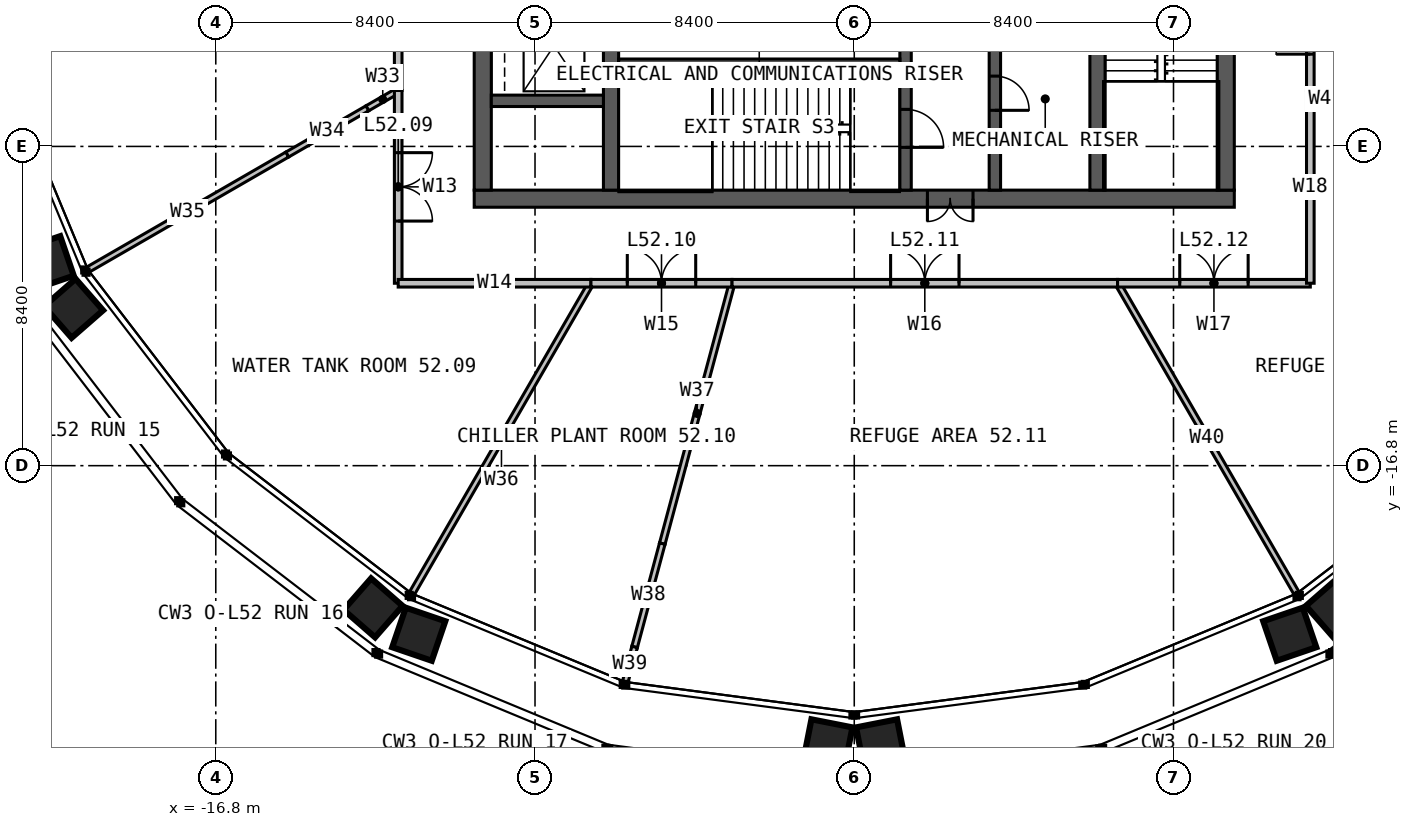
"""IFC4 building model, lengths in metres.
Left out: names, types, materials, properties, quantities, classifications, styles, units other than length and angle.
Written with IfcOpenShell. Run it as: python <this file> out.ifc"""

import sys

from ifc_helpers import new_model, si_unit, direction, frame, frame_2d, origin, place, context, subcontext, project, spatial, rectangle, extrude, element, fill, save


model = new_model("IFC4")
c1 = context("Model", 3, precision=1e-05, world=origin(), true_north=direction((0.0, 1.0)))
c2 = subcontext(c1, "Body", "Model", "MODEL_VIEW")
j1 = project(units=[si_unit("LENGTHUNIT", "METRE"), si_unit("PLANEANGLEUNIT", "RADIAN")], contexts=[c1])
p1 = place(None, origin())
s1 = spatial("IfcSite", under=j1, at=p1, CompositionType="ELEMENT")
p2 = place(p1, origin())
s2 = spatial("IfcBuilding", under=s1, at=p2, CompositionType="ELEMENT")
p3 = place(p2, frame((0.0, 0.0, 215.0)))
s3 = spatial("IfcBuildingStorey", under=s2, at=p3, CompositionType="ELEMENT", Elevation=215.0)
p4 = place(p3, frame((10.0, -9.775, 0.0), z_axis=(0.0, 0.0, 1.0), x_axis=(-1.0, 0.0, 0.0)))
e1 = element("IfcWall", 1, at=p4, inside=s3, PredefinedType="SOLIDWALL", context=c2, shape_type="SweptSolid", body=[
    extrude(rectangle(XDim=20.0, YDim=0.45, at=frame_2d((10.0, 0.0))), origin(), (0.0, 0.0, 1.0), 5.0),
])
p5 = place(p4, frame((6.875, 0.0, 0.0)))
e2 = element("IfcOpeningElement", 2, at=p5, cuts=e1, PredefinedType="OPENING", context=c2, shape_type="SweptSolid", body=[
    extrude(rectangle(XDim=1.2, YDim=2.2, at=frame_2d((0.6, 1.1))), frame((0.0, 0.235, 0.0), z_axis=(0.0, -1.0, 0.0), x_axis=(1.0, 0.0, 0.0)), (0.0, 0.0, 1.0), 0.47),
])
for number, where, z_axis, x_axis in (
    (3, (9.775, -9.55, 0.0), (0.0, 0.0, 1.0), (0.0, 1.0, 0.0)),
    (4, (-9.775, 9.55, 0.0), (0.0, 0.0, 1.0), (0.0, -1.0, 0.0)),
):
    element("IfcWall", number, at=place(p3, frame(where, z_axis=z_axis, x_axis=x_axis)), inside=s3, PredefinedType="SOLIDWALL", context=c2, shape_type="SweptSolid", body=[
        extrude(rectangle(XDim=19.1, YDim=0.45, at=frame_2d((9.55, 0.0))), origin(), (0.0, 0.0, 1.0), 5.0),
    ])
p6 = place(p3, frame((-6.4, -9.55, 0.0), z_axis=(0.0, 0.0, 1.0), x_axis=(0.0, 1.0, 0.0)))
e5 = element("IfcWall", 5, at=p6, inside=s3, PredefinedType="SOLIDWALL", context=c2, shape_type="SweptSolid", body=[
    extrude(rectangle(XDim=19.1, YDim=0.4, at=frame_2d((9.55, 0.0))), origin(), (0.0, 0.0, 1.0), 5.0),
])
p7 = place(p6, frame((9.05, 0.0, 0.0)))
e6 = element("IfcOpeningElement", 6, at=p7, cuts=e5, PredefinedType="OPENING", context=c2, shape_type="SweptSolid", body=[
    extrude(rectangle(XDim=1.0, YDim=2.2, at=frame_2d((0.5, 1.1))), frame((0.0, 0.21, 0.0), z_axis=(0.0, -1.0, 0.0), x_axis=(1.0, 0.0, 0.0)), (0.0, 0.0, 1.0), 0.42),
])
p8 = place(p3, frame((6.4, 9.55, 0.0), z_axis=(0.0, 0.0, 1.0), x_axis=(0.0, -1.0, 0.0)))
e7 = element("IfcWall", 7, at=p8, inside=s3, PredefinedType="SOLIDWALL", context=c2, shape_type="SweptSolid", body=[
    extrude(rectangle(XDim=19.1, YDim=0.4, at=frame_2d((9.55, 0.0))), origin(), (0.0, 0.0, 1.0), 5.0),
])
p9 = place(p8, frame((9.05, 0.0, 0.0)))
e8 = element("IfcOpeningElement", 8, at=p9, cuts=e7, PredefinedType="OPENING", context=c2, shape_type="SweptSolid", body=[
    extrude(rectangle(XDim=1.0, YDim=2.2, at=frame_2d((0.5, 1.1))), frame((0.0, 0.21, 0.0), z_axis=(0.0, -1.0, 0.0), x_axis=(1.0, 0.0, 0.0)), (0.0, 0.0, 1.0), 0.42),
])
p10 = place(p3, frame((1.35, -1.45, 0.0), z_axis=(0.0, 0.0, 1.0), x_axis=(0.0, -1.0, 0.0)))
e9 = element("IfcWall", 9, at=p10, inside=s3, PredefinedType="SOLIDWALL", context=c2, shape_type="SweptSolid", body=[
    extrude(rectangle(XDim=8.1, YDim=0.3, at=frame_2d((4.05, 0.0))), origin(), (0.0, 0.0, 1.0), 5.0),
])
p11 = place(p10, frame((5.975, 0.0, 0.0)))
e10 = element("IfcOpeningElement", 10, at=p11, cuts=e9, PredefinedType="OPENING", context=c2, shape_type="SweptSolid", body=[
    extrude(rectangle(XDim=1.0, YDim=2.2, at=frame_2d((0.5, 1.1))), frame((0.0, 0.16, 0.0), z_axis=(0.0, -1.0, 0.0), x_axis=(1.0, 0.0, 0.0)), (0.0, 0.0, 1.0), 0.32),
])
p12 = place(p10, frame((3.525, 0.0, 0.0)))
e11 = element("IfcOpeningElement", 11, at=p12, cuts=e9, PredefinedType="OPENING", context=c2, shape_type="SweptSolid", body=[
    extrude(rectangle(XDim=0.9, YDim=2.2, at=frame_2d((0.45, 1.1))), frame((0.0, 0.16, 0.0), z_axis=(0.0, -1.0, 0.0), x_axis=(1.0, 0.0, 0.0)), (0.0, 0.0, 1.0), 0.32),
])
p13 = place(p3, frame((3.7, -1.45, 0.0), z_axis=(0.0, 0.0, 1.0), x_axis=(0.0, -1.0, 0.0)))
e12 = element("IfcWall", 12, at=p13, inside=s3, PredefinedType="SOLIDWALL", context=c2, shape_type="SweptSolid", body=[
    extrude(rectangle(XDim=8.1, YDim=0.3, at=frame_2d((4.05, 0.0))), origin(), (0.0, 0.0, 1.0), 5.0),
])
p14 = place(p13, frame((5.1, 0.0, 0.0)))
e13 = element("IfcOpeningElement", 13, at=p14, cuts=e12, PredefinedType="OPENING", context=c2, shape_type="SweptSolid", body=[
    extrude(rectangle(XDim=0.9, YDim=2.2, at=frame_2d((0.45, 1.1))), frame((0.0, 0.16, 0.0), z_axis=(0.0, -1.0, 0.0), x_axis=(1.0, 0.0, 0.0)), (0.0, 0.0, 1.0), 0.32),
])
p15 = place(p3, frame((-6.2, -6.2, 0.0), z_axis=(0.0, 0.0, 1.0), x_axis=(1.0, 0.0, 0.0)))
e14 = element("IfcWall", 14, at=p15, inside=s3, PredefinedType="SOLIDWALL", context=c2, shape_type="SweptSolid", body=[
    extrude(rectangle(XDim=7.4, YDim=0.2, at=frame_2d((3.7, 0.0))), origin(), (0.0, 0.0, 1.0), 5.0),
])
p16 = place(p3, frame((-9.55, -7.2, 0.0), z_axis=(0.0, 0.0, 1.0), x_axis=(1.0, 0.0, 0.0)))
e15 = element("IfcWall", 15, at=p16, inside=s3, PredefinedType="SOLIDWALL", context=c2, shape_type="SweptSolid", body=[
    extrude(rectangle(XDim=2.95, YDim=0.3, at=frame_2d((1.475, 0.0))), origin(), (0.0, 0.0, 1.0), 5.0),
])
for number, where, z_axis, x_axis in (
    (16, (12.0, -6.928, 0.0), (0.0, 0.0, 1.0), (0.866, -0.5, 0.0)),
    (17, (-12.0, -6.928, 0.0), (0.0, 0.0, 1.0), (-0.866, -0.5, 0.0)),
):
    element("IfcWall", number, at=place(p3, frame(where, z_axis=z_axis, x_axis=x_axis)), inside=s3, PredefinedType="PARTITIONING", context=c2, shape_type="SweptSolid", body=[
        extrude(rectangle(XDim=0.939, YDim=0.15, at=frame_2d((0.469, 0.0))), origin(), (0.0, 0.0, 1.0), 4.8),
    ])
p17 = place(p3, frame((-12.813, -7.398, 0.0), z_axis=(0.0, 0.0, 1.0), x_axis=(-0.86601855109, -0.500011869027, 0.0)))
e18 = element("IfcWall", 18, at=p17, inside=s3, PredefinedType="PARTITIONING", context=c2, shape_type="SweptSolid", body=[
    extrude(rectangle(XDim=2.434, YDim=0.15, at=frame_2d((1.217, 0.0))), origin(), (0.0, 0.0, 1.0), 3.79),
])
p18 = place(p3, frame((-14.921, -8.615, 0.0), z_axis=(0.0, 0.0, 1.0), x_axis=(-0.866017437, -0.500013798622, 0.0)))
e19 = element("IfcWall", 19, at=p18, inside=s3, PredefinedType="PARTITIONING", context=c2, shape_type="SweptSolid", body=[
    extrude(rectangle(XDim=6.045, YDim=0.15, at=frame_2d((3.022, 0.0))), origin(), (0.0, 0.0, 1.0), 4.8),
])
p19 = place(p3, frame((-6.928, -12.0, 0.0), z_axis=(0.0, 0.0, 1.0), x_axis=(-0.500008934908, -0.866020245151, 0.0)))
e20 = element("IfcWall", 20, at=p19, inside=s3, PredefinedType="PARTITIONING", context=c2, shape_type="SweptSolid", body=[
    extrude(rectangle(XDim=9.418, YDim=0.15, at=frame_2d((4.709, 0.0))), origin(), (0.0, 0.0, 1.0), 4.8),
])
p20 = place(p3, frame((-3.215, -12.0, 0.0), z_axis=(0.0, 0.0, 1.0), x_axis=(-0.258845050614, -0.965918857758, 0.0)))
e21 = element("IfcWall", 21, at=p20, inside=s3, PredefinedType="PARTITIONING", context=c2, shape_type="SweptSolid", body=[
    extrude(rectangle(XDim=7.093, YDim=0.15, at=frame_2d((3.546, 0.0))), origin(), (0.0, 0.0, 1.0), 4.8),
])
p21 = place(p3, frame((-5.051, -18.851, 0.0), z_axis=(0.0, 0.0, 1.0), x_axis=(-0.258741864149, -0.965946503558, 0.0)))
e22 = element("IfcWall", 22, at=p21, inside=s3, PredefinedType="PARTITIONING", context=c2, shape_type="SweptSolid", body=[
    extrude(rectangle(XDim=2.816, YDim=0.15, at=frame_2d((1.408, 0.0))), origin(), (0.0, 0.0, 1.0), 3.79),
])
p22 = place(p3, frame((-5.78, -21.571, 0.0), z_axis=(0.0, 0.0, 1.0), x_axis=(-0.259016592134, -0.965872872069, 0.0)))
e23 = element("IfcWall", 23, at=p22, inside=s3, PredefinedType="PARTITIONING", context=c2, shape_type="SweptSolid", body=[
    extrude(rectangle(XDim=0.943, YDim=0.15, at=frame_2d((0.471, 0.0))), origin(), (0.0, 0.0, 1.0), 4.8),
])
p23 = place(p3, frame((6.928, -12.0, 0.0), z_axis=(0.0, 0.0, 1.0), x_axis=(0.500008934908, -0.866020245151, 0.0)))
e24 = element("IfcWall", 24, at=p23, inside=s3, PredefinedType="PARTITIONING", context=c2, shape_type="SweptSolid", body=[
    extrude(rectangle(XDim=9.418, YDim=0.15, at=frame_2d((4.709, 0.0))), origin(), (0.0, 0.0, 1.0), 4.8),
])
p24 = place(p3, frame((12.0, -6.928, 0.0), z_axis=(0.0, 0.0, 1.0), x_axis=(0.0, 1.0, 0.0)))
e25 = element("IfcWall", 25, at=p24, inside=s3, PredefinedType="PARTITIONING", context=c2, shape_type="SweptSolid", body=[
    extrude(rectangle(XDim=3.713, YDim=0.2, at=frame_2d((1.856, 0.0))), origin(), (0.0, 0.0, 1.0), 4.8),
])
p25 = place(p24, frame((0.956, 0.0, 0.0)))
e26 = element("IfcOpeningElement", 26, at=p25, cuts=e25, PredefinedType="OPENING", context=c2, shape_type="SweptSolid", body=[
    extrude(rectangle(XDim=1.8, YDim=2.2, at=frame_2d((0.9, 1.1))), frame((0.0, 0.11, 0.0), z_axis=(0.0, -1.0, 0.0), x_axis=(1.0, 0.0, 0.0)), (0.0, 0.0, 1.0), 0.22),
])
p26 = place(p3, frame((-12.0, 3.215, 0.0), z_axis=(0.0, 0.0, 1.0), x_axis=(0.0, -1.0, 0.0)))
e27 = element("IfcWall", 27, at=p26, inside=s3, PredefinedType="PARTITIONING", context=c2, shape_type="SweptSolid", body=[
    extrude(rectangle(XDim=10.144, YDim=0.2, at=frame_2d((5.072, 0.0))), origin(), (0.0, 0.0, 1.0), 4.8),
])
p27 = place(p26, frame((4.172, 0.0, 0.0)))
e28 = element("IfcOpeningElement", 28, at=p27, cuts=e27, PredefinedType="OPENING", context=c2, shape_type="SweptSolid", body=[
    extrude(rectangle(XDim=1.8, YDim=2.2, at=frame_2d((0.9, 1.1))), frame((0.0, 0.11, 0.0), z_axis=(0.0, -1.0, 0.0), x_axis=(1.0, 0.0, 0.0)), (0.0, 0.0, 1.0), 0.22),
])
p28 = place(p3, frame((-12.0, -6.928, 0.0), z_axis=(0.0, 0.0, 1.0), x_axis=(0.0, -1.0, 0.0)))
e29 = element("IfcWall", 29, at=p28, inside=s3, PredefinedType="PARTITIONING", context=c2, shape_type="SweptSolid", body=[
    extrude(rectangle(XDim=5.072, YDim=0.2, at=frame_2d((2.536, 0.0))), origin(), (0.0, 0.0, 1.0), 4.8),
])
p29 = place(p28, frame((1.636, 0.0, 0.0)))
e30 = element("IfcOpeningElement", 30, at=p29, cuts=e29, PredefinedType="OPENING", context=c2, shape_type="SweptSolid", body=[
    extrude(rectangle(XDim=1.8, YDim=2.2, at=frame_2d((0.9, 1.1))), frame((0.0, 0.11, 0.0), z_axis=(0.0, -1.0, 0.0), x_axis=(1.0, 0.0, 0.0)), (0.0, 0.0, 1.0), 0.22),
])
p30 = place(p3, frame((-12.0, -12.0, 0.0), z_axis=(0.0, 0.0, 1.0), x_axis=(1.0, 0.0, 0.0)))
e31 = element("IfcWall", 31, at=p30, inside=s3, PredefinedType="PARTITIONING", context=c2, shape_type="SweptSolid", body=[
    extrude(rectangle(XDim=5.072, YDim=0.2, at=frame_2d((2.536, 0.0))), origin(), (0.0, 0.0, 1.0), 4.8),
])
p31 = place(p3, frame((-6.928, -12.0, 0.0), z_axis=(0.0, 0.0, 1.0), x_axis=(1.0, 0.0, 0.0)))
e32 = element("IfcWall", 32, at=p31, inside=s3, PredefinedType="PARTITIONING", context=c2, shape_type="SweptSolid", body=[
    extrude(rectangle(XDim=3.713, YDim=0.2, at=frame_2d((1.856, 0.0))), origin(), (0.0, 0.0, 1.0), 4.8),
])
p32 = place(p31, frame((0.956, 0.0, 0.0)))
e33 = element("IfcOpeningElement", 33, at=p32, cuts=e32, PredefinedType="OPENING", context=c2, shape_type="SweptSolid", body=[
    extrude(rectangle(XDim=1.8, YDim=2.2, at=frame_2d((0.9, 1.1))), frame((0.0, 0.11, 0.0), z_axis=(0.0, -1.0, 0.0), x_axis=(1.0, 0.0, 0.0)), (0.0, 0.0, 1.0), 0.22),
])
p33 = place(p3, frame((-3.215, -12.0, 0.0), z_axis=(0.0, 0.0, 1.0), x_axis=(1.0, 0.0, 0.0)))
e34 = element("IfcWall", 34, at=p33, inside=s3, PredefinedType="PARTITIONING", context=c2, shape_type="SweptSolid", body=[
    extrude(rectangle(XDim=10.144, YDim=0.2, at=frame_2d((5.072, 0.0))), origin(), (0.0, 0.0, 1.0), 4.8),
])
p34 = place(p33, frame((4.172, 0.0, 0.0)))
e35 = element("IfcOpeningElement", 35, at=p34, cuts=e34, PredefinedType="OPENING", context=c2, shape_type="SweptSolid", body=[
    extrude(rectangle(XDim=1.8, YDim=2.2, at=frame_2d((0.9, 1.1))), frame((0.0, 0.11, 0.0), z_axis=(0.0, -1.0, 0.0), x_axis=(1.0, 0.0, 0.0)), (0.0, 0.0, 1.0), 0.22),
])
p35 = place(p3, frame((6.928, -12.0, 0.0), z_axis=(0.0, 0.0, 1.0), x_axis=(1.0, 0.0, 0.0)))
e36 = element("IfcWall", 36, at=p35, inside=s3, PredefinedType="PARTITIONING", context=c2, shape_type="SweptSolid", body=[
    extrude(rectangle(XDim=5.072, YDim=0.2, at=frame_2d((2.536, 0.0))), origin(), (0.0, 0.0, 1.0), 4.8),
])
p36 = place(p35, frame((1.636, 0.0, 0.0)))
e37 = element("IfcOpeningElement", 37, at=p36, cuts=e36, PredefinedType="OPENING", context=c2, shape_type="SweptSolid", body=[
    extrude(rectangle(XDim=1.8, YDim=2.2, at=frame_2d((0.9, 1.1))), frame((0.0, 0.11, 0.0), z_axis=(0.0, -1.0, 0.0), x_axis=(1.0, 0.0, 0.0)), (0.0, 0.0, 1.0), 0.22),
])
p37 = place(p3, frame((12.0, -12.0, 0.0), z_axis=(0.0, 0.0, 1.0), x_axis=(0.0, 1.0, 0.0)))
e38 = element("IfcWall", 38, at=p37, inside=s3, PredefinedType="PARTITIONING", context=c2, shape_type="SweptSolid", body=[
    extrude(rectangle(XDim=5.072, YDim=0.2, at=frame_2d((2.536, 0.0))), origin(), (0.0, 0.0, 1.0), 4.8),
])
p38 = place(p5, origin())
e39 = element("IfcDoor", 39, at=p38, inside=s3, OperationType="DOUBLE_DOOR_SINGLE_SWING", PredefinedType="DOOR", context=c2, shape_type="SweptSolid", body=[
    extrude(rectangle(XDim=1.2, YDim=2.2, at=frame_2d((0.6, 1.1))), frame((0.0, 0.025, 0.0), z_axis=(0.0, -1.0, 0.0), x_axis=(1.0, 0.0, 0.0)), (0.0, 0.0, 1.0), 0.05),
])
fill(e2, e39)
p39 = place(p11, origin())
e40 = element("IfcDoor", 40, at=p39, inside=s3, OperationType="SINGLE_SWING_RIGHT", PredefinedType="DOOR", context=c2, shape_type="SweptSolid", body=[
    extrude(rectangle(XDim=1.0, YDim=2.2, at=frame_2d((0.5, 1.1))), frame((0.0, 0.025, 0.0), z_axis=(0.0, -1.0, 0.0), x_axis=(1.0, 0.0, 0.0)), (0.0, 0.0, 1.0), 0.05),
])
fill(e10, e40)
p40 = place(p14, origin())
e41 = element("IfcDoor", 41, at=p40, inside=s3, OperationType="SINGLE_SWING_RIGHT", PredefinedType="DOOR", context=c2, shape_type="SweptSolid", body=[
    extrude(rectangle(XDim=0.9, YDim=2.2, at=frame_2d((0.45, 1.1))), frame((0.0, 0.025, 0.0), z_axis=(0.0, -1.0, 0.0), x_axis=(1.0, 0.0, 0.0)), (0.0, 0.0, 1.0), 0.05),
])
fill(e13, e41)
p41 = place(p25, origin())
e42 = element("IfcDoor", 42, at=p41, inside=s3, OperationType="DOUBLE_DOOR_SINGLE_SWING", PredefinedType="DOOR", context=c2, shape_type="SweptSolid", body=[
    extrude(rectangle(XDim=1.8, YDim=2.2, at=frame_2d((0.9, 1.1))), frame((0.0, 0.025, 0.0), z_axis=(0.0, -1.0, 0.0), x_axis=(1.0, 0.0, 0.0)), (0.0, 0.0, 1.0), 0.05),
])
fill(e26, e42)
p42 = place(p29, origin())
e43 = element("IfcDoor", 43, at=p42, inside=s3, OperationType="DOUBLE_DOOR_SINGLE_SWING", PredefinedType="DOOR", context=c2, shape_type="SweptSolid", body=[
    extrude(rectangle(XDim=1.8, YDim=2.2, at=frame_2d((0.9, 1.1))), frame((0.0, 0.025, 0.0), z_axis=(0.0, -1.0, 0.0), x_axis=(1.0, 0.0, 0.0)), (0.0, 0.0, 1.0), 0.05),
])
fill(e30, e43)
p43 = place(p32, origin())
e44 = element("IfcDoor", 44, at=p43, inside=s3, OperationType="DOUBLE_DOOR_SINGLE_SWING", PredefinedType="DOOR", context=c2, shape_type="SweptSolid", body=[
    extrude(rectangle(XDim=1.8, YDim=2.2, at=frame_2d((0.9, 1.1))), frame((0.0, 0.025, 0.0), z_axis=(0.0, -1.0, 0.0), x_axis=(1.0, 0.0, 0.0)), (0.0, 0.0, 1.0), 0.05),
])
fill(e33, e44)
p44 = place(p34, origin())
e45 = element("IfcDoor", 45, at=p44, inside=s3, OperationType="DOUBLE_DOOR_SINGLE_SWING", PredefinedType="DOOR", context=c2, shape_type="SweptSolid", body=[
    extrude(rectangle(XDim=1.8, YDim=2.2, at=frame_2d((0.9, 1.1))), frame((0.0, 0.025, 0.0), z_axis=(0.0, -1.0, 0.0), x_axis=(1.0, 0.0, 0.0)), (0.0, 0.0, 1.0), 0.05),
])
fill(e35, e45)
p45 = place(p36, origin())
e46 = element("IfcDoor", 46, at=p45, inside=s3, OperationType="DOUBLE_DOOR_SINGLE_SWING", PredefinedType="DOOR", context=c2, shape_type="SweptSolid", body=[
    extrude(rectangle(XDim=1.8, YDim=2.2, at=frame_2d((0.9, 1.1))), frame((0.0, 0.025, 0.0), z_axis=(0.0, -1.0, 0.0), x_axis=(1.0, 0.0, 0.0)), (0.0, 0.0, 1.0), 0.05),
])
fill(e37, e46)
save(model, sys.argv[1])
